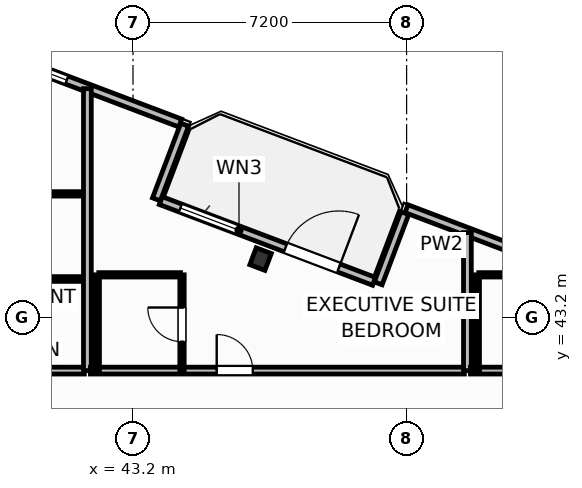
"""IFC4 building model, lengths in metres.
Left out: names, types, materials, properties, quantities, classifications, styles, units other than length and angle.
Written with IfcOpenShell. Run it as: python <this file> out.ifc"""

import sys

from ifc_helpers import new_model, si_unit, direction, frame, frame_2d, origin, origin_2d, place, context, subcontext, project, spatial, rectangle, i_section, extrude, element, fill, save


model = new_model("IFC4")
c1 = context("Model", 3, precision=1e-05, world=origin(), true_north=direction((0.0, 1.0)))
c2 = subcontext(c1, "Body", "Model", "MODEL_VIEW")
j1 = project(units=[si_unit("LENGTHUNIT", "METRE"), si_unit("PLANEANGLEUNIT", "RADIAN")], contexts=[c1])
p1 = place(None, origin())
s1 = spatial("IfcSite", under=j1, at=p1, CompositionType="ELEMENT")
p2 = place(p1, origin())
s2 = spatial("IfcBuilding", under=s1, at=p2, CompositionType="ELEMENT")
p3 = place(p2, frame((0.0, 0.0, 102.1)))
s3 = spatial("IfcBuildingStorey", under=s2, at=p3, CompositionType="ELEMENT", Elevation=102.1)
p4 = place(p3, frame((46.557, 44.734, 0.0), z_axis=(0.0, 0.0, 1.0), x_axis=(0.935221751401, -0.354062530786, 0.0)))
e1 = element("IfcColumn", 1, at=p4, inside=s3, PredefinedType="COLUMN", context=c2, shape_type="SweptSolid", body=[
    extrude(i_section(OverallWidth=0.424, OverallDepth=0.474, WebThickness=0.048, FlangeThickness=0.077, FilletRadius=0.025, at=origin_2d()), origin(), (0.0, 0.0, 1.0), 3.7),
])
p5 = place(p3, frame((43.932, 46.273, 0.0), z_axis=(0.0, 0.0, 1.0), x_axis=(0.93521416643, -0.354082565101, 0.0)))
e2 = element("IfcWall", 2, at=p5, inside=s3, PredefinedType="SOLIDWALL", context=c2, shape_type="SweptSolid", body=[
    extrude(rectangle(XDim=6.0, YDim=0.22, at=frame_2d((3.0, 0.0))), origin(), (0.0, 0.0, 1.0), 2.73),
])
p6 = place(p5, frame((3.508, 0.0, 0.0)))
e3 = element("IfcOpeningElement", 3, at=p6, cuts=e2, PredefinedType="OPENING", context=c2, shape_type="SweptSolid", body=[
    extrude(rectangle(XDim=1.5, YDim=2.25, at=frame_2d((0.75, 1.125))), frame((0.0, 0.12, 0.0), z_axis=(0.0, -1.0, 0.0), x_axis=(1.0, 0.0, 0.0)), (0.0, 0.0, 1.0), 0.24),
])
p7 = place(p5, frame((0.55, 0.0, 0.75)))
e4 = element("IfcOpeningElement", 4, at=p7, cuts=e2, PredefinedType="OPENING", context=c2, shape_type="SweptSolid", body=[
    extrude(rectangle(XDim=1.65, YDim=1.65, at=frame_2d((0.825, 0.825))), frame((0.0, 0.12, 0.0), z_axis=(0.0, -1.0, 0.0), x_axis=(1.0, 0.0, 0.0)), (0.0, 0.0, 1.0), 0.24),
])
p8 = place(p3, frame((57.91, 43.216, 0.0), z_axis=(0.0, 0.0, 1.0), x_axis=(-0.935220736163, 0.354065212427, 0.0)))
e5 = element("IfcWall", 5, at=p8, inside=s3, PredefinedType="SOLIDWALL", context=c2, shape_type="SweptSolid", body=[
    extrude(rectangle(XDim=8.035, YDim=0.22, at=frame_2d((4.018, 0.0))), origin(), (0.0, 0.0, 1.0), 2.73),
])
p9 = place(p8, frame((3.192, 0.0, 0.8)))
e6 = element("IfcOpeningElement", 6, at=p9, cuts=e5, PredefinedType="OPENING", context=c2, shape_type="SweptSolid", body=[
    extrude(rectangle(XDim=1.65, YDim=1.65, at=frame_2d((0.825, 0.825))), frame((0.0, 0.12, 0.0), z_axis=(0.0, -1.0, 0.0), x_axis=(1.0, 0.0, 0.0)), (0.0, 0.0, 1.0), 0.24),
])
p10 = place(p3, frame((50.352, 45.944, 0.0), z_axis=(0.0, 0.0, 1.0), x_axis=(-0.354061611705, -0.935222099352, 0.0)))
e7 = element("IfcWall", 7, at=p10, inside=s3, PredefinedType="SOLIDWALL", context=c2, shape_type="SweptSolid", body=[
    extrude(rectangle(XDim=1.975, YDim=0.22, at=frame_2d((0.987, 0.0))), origin(), (0.0, 0.0, 1.0), 2.73),
])
p11 = place(p3, frame((43.817, 46.306, 0.0), z_axis=(0.0, 0.0, 1.0), x_axis=(0.353988291547, 0.935249854022, 0.0)))
e8 = element("IfcWall", 8, at=p11, inside=s3, PredefinedType="SOLIDWALL", context=c2, shape_type="SweptSolid", body=[
    extrude(rectangle(XDim=2.1, YDim=0.22, at=frame_2d((1.05, 0.0))), origin(), (0.0, 0.0, 1.0), 2.73),
])
p12 = place(p3, frame((44.443, 48.314, 0.0), z_axis=(0.0, 0.0, 1.0), x_axis=(-0.935226988293, 0.354048697735, 0.0)))
e9 = element("IfcWall", 9, at=p12, inside=s3, PredefinedType="SOLIDWALL", context=c2, shape_type="SweptSolid", body=[
    extrude(rectangle(XDim=8.035, YDim=0.22, at=frame_2d((4.018, 0.0))), origin(), (0.0, 0.0, 1.0), 2.73),
])
p13 = place(p12, frame((3.192, 0.0, 0.8)))
e10 = element("IfcOpeningElement", 10, at=p13, cuts=e9, PredefinedType="OPENING", context=c2, shape_type="SweptSolid", body=[
    extrude(rectangle(XDim=1.65, YDim=1.65, at=frame_2d((0.825, 0.825))), frame((0.0, 0.12, 0.0), z_axis=(0.0, -1.0, 0.0), x_axis=(1.0, 0.0, 0.0)), (0.0, 0.0, 1.0), 0.24),
])
p14 = place(p3, frame((32.08, 41.8, 0.0), z_axis=(0.0, 0.0, 1.0), x_axis=(1.0, 0.0, 0.0)))
e11 = element("IfcWall", 11, at=p14, inside=s3, PredefinedType="PARTITIONING", context=c2, shape_type="SweptSolid", body=[
    extrude(rectangle(XDim=9.84, YDim=0.18, at=frame_2d((4.92, 0.0))), origin(), (0.0, 0.0, 1.0), 3.45),
])
p15 = place(p14, frame((2.302, 0.0, 0.0)))
e12 = element("IfcOpeningElement", 12, at=p15, cuts=e11, PredefinedType="OPENING", context=c2, shape_type="SweptSolid", body=[
    extrude(rectangle(XDim=1.0, YDim=2.2, at=frame_2d((0.5, 1.1))), frame((0.0, 0.1, 0.0), z_axis=(0.0, -1.0, 0.0), x_axis=(1.0, 0.0, 0.0)), (0.0, 0.0, 1.0), 0.2),
])
p16 = place(p3, frame((37.825, 44.21, 0.0), z_axis=(0.0, 0.0, 1.0), x_axis=(1.0, 0.0, 0.0)))
e13 = element("IfcWall", 13, at=p16, inside=s3, PredefinedType="PARTITIONING", context=c2, shape_type="SweptSolid", body=[
    extrude(rectangle(XDim=4.095, YDim=0.125, at=frame_2d((2.047, 0.0))), origin(), (0.0, 0.0, 1.0), 2.972),
])
p17 = place(p3, frame((37.825, 46.45, 0.0), z_axis=(0.0, 0.0, 1.0), x_axis=(1.0, 0.0, 0.0)))
e14 = element("IfcWall", 14, at=p17, inside=s3, PredefinedType="PARTITIONING", context=c2, shape_type="SweptSolid", body=[
    extrude(rectangle(XDim=4.095, YDim=0.115, at=frame_2d((2.047, 0.0))), origin(), (0.0, 0.0, 1.0), 3.45),
])
p18 = place(p3, frame((42.0, 41.8, 0.0), z_axis=(0.0, 0.0, 1.0), x_axis=(0.0, 1.0, 0.0)))
e15 = element("IfcWall", 15, at=p18, inside=s3, PredefinedType="PARTITIONING", context=c2, shape_type="SweptSolid", body=[
    extrude(rectangle(XDim=7.418, YDim=0.205, at=frame_2d((3.709, 0.0))), origin(), (0.0, 0.0, 1.0), 3.45),
])
p19 = place(p3, frame((42.08, 41.8, 0.0), z_axis=(0.0, 0.0, 1.0), x_axis=(1.0, 0.0, 0.0)))
e16 = element("IfcWall", 16, at=p19, inside=s3, PredefinedType="PARTITIONING", context=c2, shape_type="SweptSolid", body=[
    extrude(rectangle(XDim=9.84, YDim=0.18, at=frame_2d((4.92, 0.0))), origin(), (0.0, 0.0, 1.0), 3.45),
])
p20 = place(p19, frame((3.323, 0.0, 0.0)))
e17 = element("IfcOpeningElement", 17, at=p20, cuts=e16, PredefinedType="OPENING", context=c2, shape_type="SweptSolid", body=[
    extrude(rectangle(XDim=0.95, YDim=2.15, at=frame_2d((0.475, 1.075))), frame((0.0, 0.1, 0.0), z_axis=(0.0, -1.0, 0.0), x_axis=(1.0, 0.0, 0.0)), (0.0, 0.0, 1.0), 0.2),
])
p21 = place(p3, frame((42.3, 44.32, 0.0), z_axis=(0.0, 0.0, 1.0), x_axis=(1.0, 0.0, 0.0)))
e18 = element("IfcWall", 18, at=p21, inside=s3, PredefinedType="PARTITIONING", context=c2, shape_type="SweptSolid", body=[
    extrude(rectangle(XDim=2.15, YDim=0.115, at=frame_2d((1.075, 0.0))), origin(), (0.0, 0.0, 1.0), 3.45),
])
p22 = place(p3, frame((44.49, 41.8, 0.0), z_axis=(0.0, 0.0, 1.0), x_axis=(0.0, 1.0, 0.0)))
e19 = element("IfcWall", 19, at=p22, inside=s3, PredefinedType="PARTITIONING", context=c2, shape_type="SweptSolid", body=[
    extrude(rectangle(XDim=2.52, YDim=0.115, at=frame_2d((1.26, 0.0))), origin(), (0.0, 0.0, 1.0), 3.45),
])
p23 = place(p22, frame((0.76, 0.0, 0.0)))
e20 = element("IfcOpeningElement", 20, at=p23, cuts=e19, PredefinedType="OPENING", context=c2, shape_type="SweptSolid", body=[
    extrude(rectangle(XDim=0.9, YDim=2.05, at=frame_2d((0.45, 1.025))), frame((0.0, 0.067, 0.0), z_axis=(0.0, -1.0, 0.0), x_axis=(1.0, 0.0, 0.0)), (0.0, 0.0, 1.0), 0.135),
])
p24 = place(p3, frame((42.26, 41.8, 0.0), z_axis=(0.0, 0.0, 1.0), x_axis=(0.0, 1.0, 0.0)))
e21 = element("IfcWall", 21, at=p24, inside=s3, PredefinedType="PARTITIONING", context=c2, shape_type="SweptSolid", body=[
    extrude(rectangle(XDim=2.52, YDim=0.115, at=frame_2d((1.26, 0.0))), origin(), (0.0, 0.0, 1.0), 3.45),
])
p25 = place(p3, frame((52.0, 41.8, 0.0), z_axis=(0.0, 0.0, 1.0), x_axis=(0.0, 1.0, 0.0)))
e22 = element("IfcWall", 22, at=p25, inside=s3, PredefinedType="PARTITIONING", context=c2, shape_type="SweptSolid", body=[
    extrude(rectangle(XDim=3.632, YDim=0.205, at=frame_2d((1.816, 0.0))), origin(), (0.0, 0.0, 1.0), 3.45),
])
p26 = place(p3, frame((52.08, 41.8, 0.0), z_axis=(0.0, 0.0, 1.0), x_axis=(1.0, 0.0, 0.0)))
e23 = element("IfcWall", 23, at=p26, inside=s3, PredefinedType="PARTITIONING", context=c2, shape_type="SweptSolid", body=[
    extrude(rectangle(XDim=5.406, YDim=0.18, at=frame_2d((2.703, 0.0))), origin(), (0.0, 0.0, 1.0), 3.45),
])
p27 = place(p26, frame((3.74, 0.0, 0.0)))
e24 = element("IfcOpeningElement", 24, at=p27, cuts=e23, PredefinedType="OPENING", context=c2, shape_type="SweptSolid", body=[
    extrude(rectangle(XDim=0.95, YDim=2.15, at=frame_2d((0.475, 1.075))), frame((0.0, 0.1, 0.0), z_axis=(0.0, -1.0, 0.0), x_axis=(1.0, 0.0, 0.0)), (0.0, 0.0, 1.0), 0.2),
])
p28 = place(p3, frame((52.3, 44.32, 0.0), z_axis=(0.0, 0.0, 1.0), x_axis=(1.0, 0.0, 0.0)))
e25 = element("IfcWall", 25, at=p28, inside=s3, PredefinedType="PARTITIONING", context=c2, shape_type="SweptSolid", body=[
    extrude(rectangle(XDim=1.788, YDim=0.115, at=frame_2d((0.894, 0.0))), origin(), (0.0, 0.0, 1.0), 3.45),
])
p29 = place(p3, frame((52.26, 41.8, 0.0), z_axis=(0.0, 0.0, 1.0), x_axis=(0.0, 1.0, 0.0)))
e26 = element("IfcWall", 26, at=p29, inside=s3, PredefinedType="PARTITIONING", context=c2, shape_type="SweptSolid", body=[
    extrude(rectangle(XDim=2.52, YDim=0.115, at=frame_2d((1.26, 0.0))), origin(), (0.0, 0.0, 1.0), 3.45),
])
p30 = place(p6, origin())
e27 = element("IfcDoor", 27, at=p30, inside=s3, OperationType="SINGLE_SWING_RIGHT", PredefinedType="DOOR", context=c2, shape_type="SweptSolid", body=[
    extrude(rectangle(XDim=1.5, YDim=2.25, at=frame_2d((0.75, 1.125))), frame((0.0, 0.025, 0.0), z_axis=(0.0, -1.0, 0.0), x_axis=(1.0, 0.0, 0.0)), (0.0, 0.0, 1.0), 0.05),
])
fill(e3, e27)
p31 = place(p7, origin())
e28 = element("IfcWindow", 28, at=p31, inside=s3, PartitioningType="SINGLE_PANEL", PredefinedType="WINDOW", context=c2, shape_type="SweptSolid", body=[
    extrude(rectangle(XDim=1.65, YDim=1.65, at=frame_2d((0.825, 0.825))), frame((0.0, 0.03, 0.0), z_axis=(0.0, -1.0, 0.0), x_axis=(1.0, 0.0, 0.0)), (0.0, 0.0, 1.0), 0.06),
])
fill(e4, e28)
p32 = place(p13, origin())
e29 = element("IfcWindow", 29, at=p32, inside=s3, PartitioningType="SINGLE_PANEL", PredefinedType="WINDOW", context=c2, shape_type="SweptSolid", body=[
    extrude(rectangle(XDim=1.65, YDim=1.65, at=frame_2d((0.825, 0.825))), frame((0.0, 0.03, 0.0), z_axis=(0.0, -1.0, 0.0), x_axis=(1.0, 0.0, 0.0)), (0.0, 0.0, 1.0), 0.06),
])
fill(e10, e29)
p33 = place(p20, origin())
e30 = element("IfcDoor", 30, at=p33, inside=s3, OperationType="SINGLE_SWING_LEFT", PredefinedType="DOOR", context=c2, shape_type="SweptSolid", body=[
    extrude(rectangle(XDim=0.95, YDim=2.15, at=frame_2d((0.475, 1.075))), frame((0.0, 0.025, 0.0), z_axis=(0.0, -1.0, 0.0), x_axis=(1.0, 0.0, 0.0)), (0.0, 0.0, 1.0), 0.05),
])
fill(e17, e30)
p34 = place(p23, origin())
e31 = element("IfcDoor", 31, at=p34, inside=s3, OperationType="SINGLE_SWING_RIGHT", PredefinedType="DOOR", context=c2, shape_type="SweptSolid", body=[
    extrude(rectangle(XDim=0.9, YDim=2.05, at=frame_2d((0.45, 1.025))), frame((0.0, 0.025, 0.0), z_axis=(0.0, -1.0, 0.0), x_axis=(1.0, 0.0, 0.0)), (0.0, 0.0, 1.0), 0.05),
])
fill(e20, e31)
save(model, sys.argv[1])
